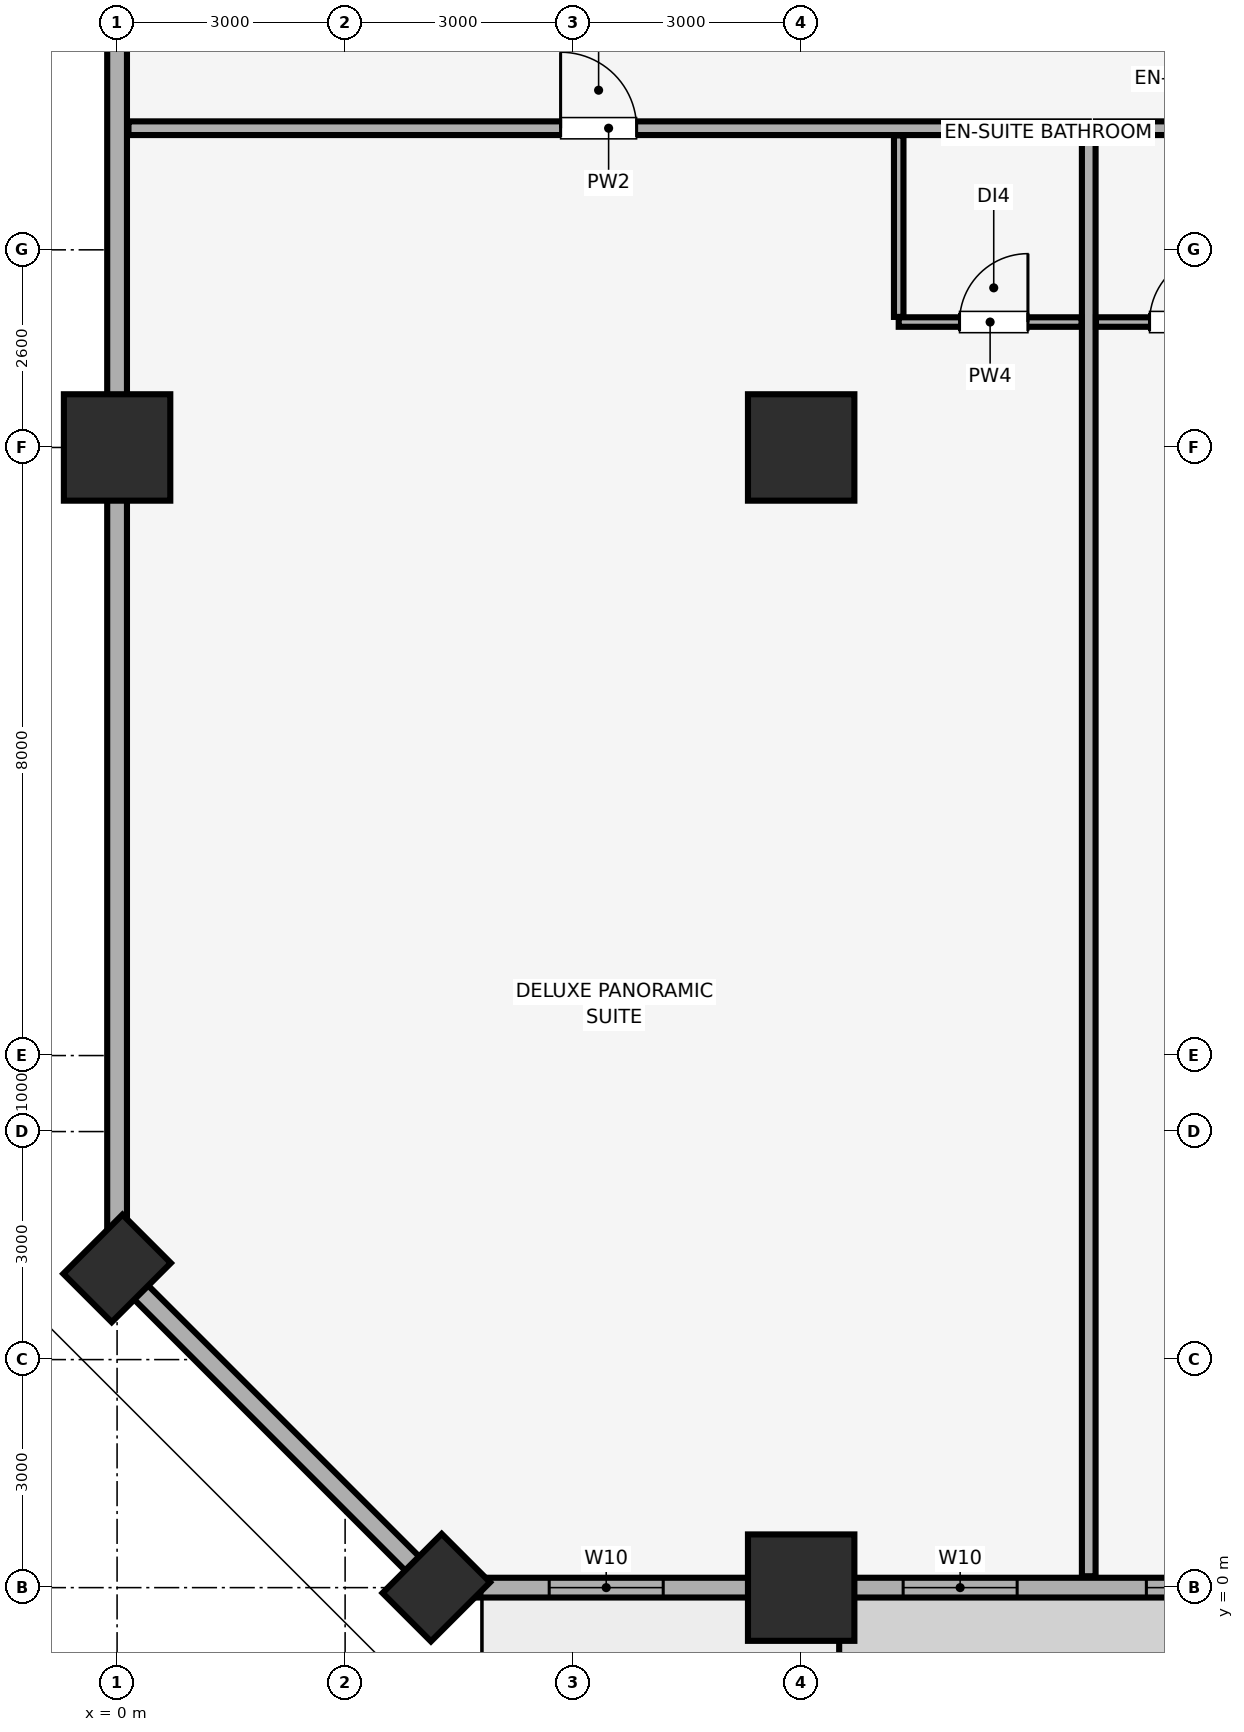
"""IFC4 building model, lengths in metres.
Left out: names, types, materials, properties, quantities, classifications, styles, units other than length and angle.
Written with IfcOpenShell. Run it as: python <this file> out.ifc"""

import sys

from ifc_helpers import new_model, si_unit, direction, frame, frame_2d, origin, origin_2d, place, context, subcontext, project, spatial, rectangle, extrude, element, fill, save


model = new_model("IFC4")
c1 = context("Model", 3, precision=1e-05, world=origin(), true_north=direction((0.0, 1.0)))
c2 = subcontext(c1, "Body", "Model", "MODEL_VIEW")
j1 = project(units=[si_unit("LENGTHUNIT", "METRE"), si_unit("PLANEANGLEUNIT", "RADIAN")], contexts=[c1])
p1 = place(None, origin())
s1 = spatial("IfcSite", under=j1, at=p1, CompositionType="ELEMENT")
p2 = place(p1, origin())
s2 = spatial("IfcBuilding", under=s1, at=p2, CompositionType="ELEMENT")
p3 = place(p2, frame((0.0, 0.0, 76.4)))
s3 = spatial("IfcBuildingStorey", under=s2, at=p3, CompositionType="ELEMENT", Elevation=76.4)
for number, where, z_axis, x_axis in (
    (1, (9.0, 0.0, 0.0), (0.0, 0.0, 1.0), (1.0, 0.0, 0.0)),
    (2, (0.0, 15.0, 0.0), (0.0, 0.0, 1.0), (1.0, 0.0, 0.0)),
):
    element("IfcColumn", number, at=place(p3, frame(where, z_axis=z_axis, x_axis=x_axis)), inside=s3, PredefinedType="COLUMN", context=c2, shape_type="SweptSolid", body=[
        extrude(rectangle(XDim=1.4, YDim=1.4, at=origin_2d()), origin(), (0.0, 0.0, 1.0), 3.4),
    ])
for number, where, z_axis, x_axis in (
    (3, (4.2, 0.0, 0.0), (0.0, 0.0, 1.0), (0.707, 0.707, 0.0)),
    (4, (0.0, 4.2, 0.0), (0.0, 0.0, 1.0), (0.707, 0.707, 0.0)),
):
    element("IfcColumn", number, at=place(p3, frame(where, z_axis=z_axis, x_axis=x_axis)), inside=s3, PredefinedType="PILASTER", context=c2, shape_type="SweptSolid", body=[
        extrude(rectangle(XDim=1.1, YDim=0.9, at=origin_2d()), origin(), (0.0, 0.0, 1.0), 3.4),
    ])
p4 = place(p3, frame((9.0, 15.0, 0.0), z_axis=(0.0, 0.0, 1.0), x_axis=(1.0, 0.0, 0.0)))
e5 = element("IfcColumn", 5, at=p4, inside=s3, PredefinedType="COLUMN", context=c2, shape_type="SweptSolid", body=[
    extrude(rectangle(XDim=1.4, YDim=1.4, at=origin_2d()), origin(), (0.0, 0.0, 1.0), 3.4),
])
p5 = place(p3, frame((4.2, 0.0, 0.0), z_axis=(0.0, 0.0, 1.0), x_axis=(1.0, 0.0, 0.0)))
e6 = element("IfcWall", 6, at=p5, inside=s3, PredefinedType="SOLIDWALL", context=c2, shape_type="SweptSolid", body=[
    extrude(rectangle(XDim=75.6, YDim=0.26, at=frame_2d((37.8, 0.0))), origin(), (0.0, 0.0, 1.0), 2.45),
])
p6 = place(p5, frame((21.383, 0.0, 0.0)))
e7 = element("IfcOpeningElement", 7, at=p6, cuts=e6, PredefinedType="OPENING", context=c2, shape_type="SweptSolid", body=[
    extrude(rectangle(XDim=1.1, YDim=2.15, at=frame_2d((0.55, 1.075))), frame((0.0, 0.14, 0.0), z_axis=(0.0, -1.0, 0.0), x_axis=(1.0, 0.0, 0.0)), (0.0, 0.0, 1.0), 0.28),
])
p7 = place(p5, frame((37.25, 0.0, 0.0)))
e8 = element("IfcOpeningElement", 8, at=p7, cuts=e6, PredefinedType="OPENING", context=c2, shape_type="SweptSolid", body=[
    extrude(rectangle(XDim=1.1, YDim=2.15, at=frame_2d((0.55, 1.075))), frame((0.0, 0.14, 0.0), z_axis=(0.0, -1.0, 0.0), x_axis=(1.0, 0.0, 0.0)), (0.0, 0.0, 1.0), 0.28),
])
p8 = place(p5, frame((53.117, 0.0, 0.0)))
e9 = element("IfcOpeningElement", 9, at=p8, cuts=e6, PredefinedType="OPENING", context=c2, shape_type="SweptSolid", body=[
    extrude(rectangle(XDim=1.1, YDim=2.15, at=frame_2d((0.55, 1.075))), frame((0.0, 0.14, 0.0), z_axis=(0.0, -1.0, 0.0), x_axis=(1.0, 0.0, 0.0)), (0.0, 0.0, 1.0), 0.28),
])
p9 = place(p5, frame((1.485, 0.0, 0.85)))
e10 = element("IfcOpeningElement", 10, at=p9, cuts=e6, PredefinedType="OPENING", context=c2, shape_type="SweptSolid", body=[
    extrude(rectangle(XDim=1.5, YDim=1.4, at=frame_2d((0.75, 0.7))), frame((0.0, 0.14, 0.0), z_axis=(0.0, -1.0, 0.0), x_axis=(1.0, 0.0, 0.0)), (0.0, 0.0, 1.0), 0.28),
])
p10 = place(p5, frame((6.142, 0.0, 0.85)))
e11 = element("IfcOpeningElement", 11, at=p10, cuts=e6, PredefinedType="OPENING", context=c2, shape_type="SweptSolid", body=[
    extrude(rectangle(XDim=1.5, YDim=1.4, at=frame_2d((0.75, 0.7))), frame((0.0, 0.14, 0.0), z_axis=(0.0, -1.0, 0.0), x_axis=(1.0, 0.0, 0.0)), (0.0, 0.0, 1.0), 0.28),
])
p11 = place(p5, frame((9.342, 0.0, 0.85)))
e12 = element("IfcOpeningElement", 12, at=p11, cuts=e6, PredefinedType="OPENING", context=c2, shape_type="SweptSolid", body=[
    extrude(rectangle(XDim=1.5, YDim=1.4, at=frame_2d((0.75, 0.7))), frame((0.0, 0.14, 0.0), z_axis=(0.0, -1.0, 0.0), x_axis=(1.0, 0.0, 0.0)), (0.0, 0.0, 1.0), 0.28),
])
p12 = place(p5, frame((13.908, 0.0, 0.85)))
e13 = element("IfcOpeningElement", 13, at=p12, cuts=e6, PredefinedType="OPENING", context=c2, shape_type="SweptSolid", body=[
    extrude(rectangle(XDim=1.5, YDim=1.4, at=frame_2d((0.75, 0.7))), frame((0.0, 0.14, 0.0), z_axis=(0.0, -1.0, 0.0), x_axis=(1.0, 0.0, 0.0)), (0.0, 0.0, 1.0), 0.28),
])
p13 = place(p5, frame((23.202, 0.0, 0.85)))
e14 = element("IfcOpeningElement", 14, at=p13, cuts=e6, PredefinedType="OPENING", context=c2, shape_type="SweptSolid", body=[
    extrude(rectangle(XDim=1.5, YDim=1.4, at=frame_2d((0.75, 0.7))), frame((0.0, 0.14, 0.0), z_axis=(0.0, -1.0, 0.0), x_axis=(1.0, 0.0, 0.0)), (0.0, 0.0, 1.0), 0.28),
])
p14 = place(p5, frame((29.25, 0.0, 0.85)))
e15 = element("IfcOpeningElement", 15, at=p14, cuts=e6, PredefinedType="OPENING", context=c2, shape_type="SweptSolid", body=[
    extrude(rectangle(XDim=1.5, YDim=1.4, at=frame_2d((0.75, 0.7))), frame((0.0, 0.14, 0.0), z_axis=(0.0, -1.0, 0.0), x_axis=(1.0, 0.0, 0.0)), (0.0, 0.0, 1.0), 0.28),
])
p15 = place(p5, frame((34.79, 0.0, 0.85)))
e16 = element("IfcOpeningElement", 16, at=p15, cuts=e6, PredefinedType="OPENING", context=c2, shape_type="SweptSolid", body=[
    extrude(rectangle(XDim=1.5, YDim=1.4, at=frame_2d((0.75, 0.7))), frame((0.0, 0.14, 0.0), z_axis=(0.0, -1.0, 0.0), x_axis=(1.0, 0.0, 0.0)), (0.0, 0.0, 1.0), 0.28),
])
p16 = place(p5, frame((39.31, 0.0, 0.85)))
e17 = element("IfcOpeningElement", 17, at=p16, cuts=e6, PredefinedType="OPENING", context=c2, shape_type="SweptSolid", body=[
    extrude(rectangle(XDim=1.5, YDim=1.4, at=frame_2d((0.75, 0.7))), frame((0.0, 0.14, 0.0), z_axis=(0.0, -1.0, 0.0), x_axis=(1.0, 0.0, 0.0)), (0.0, 0.0, 1.0), 0.28),
])
p17 = place(p5, frame((44.85, 0.0, 0.85)))
e18 = element("IfcOpeningElement", 18, at=p17, cuts=e6, PredefinedType="OPENING", context=c2, shape_type="SweptSolid", body=[
    extrude(rectangle(XDim=1.5, YDim=1.4, at=frame_2d((0.75, 0.7))), frame((0.0, 0.14, 0.0), z_axis=(0.0, -1.0, 0.0), x_axis=(1.0, 0.0, 0.0)), (0.0, 0.0, 1.0), 0.28),
])
p18 = place(p5, frame((50.848, 0.0, 0.85)))
e19 = element("IfcOpeningElement", 19, at=p18, cuts=e6, PredefinedType="OPENING", context=c2, shape_type="SweptSolid", body=[
    extrude(rectangle(XDim=1.5, YDim=1.4, at=frame_2d((0.75, 0.7))), frame((0.0, 0.14, 0.0), z_axis=(0.0, -1.0, 0.0), x_axis=(1.0, 0.0, 0.0)), (0.0, 0.0, 1.0), 0.28),
])
p19 = place(p5, frame((60.142, 0.0, 0.85)))
e20 = element("IfcOpeningElement", 20, at=p19, cuts=e6, PredefinedType="OPENING", context=c2, shape_type="SweptSolid", body=[
    extrude(rectangle(XDim=1.5, YDim=1.4, at=frame_2d((0.75, 0.7))), frame((0.0, 0.14, 0.0), z_axis=(0.0, -1.0, 0.0), x_axis=(1.0, 0.0, 0.0)), (0.0, 0.0, 1.0), 0.28),
])
p20 = place(p5, frame((64.708, 0.0, 0.85)))
e21 = element("IfcOpeningElement", 21, at=p20, cuts=e6, PredefinedType="OPENING", context=c2, shape_type="SweptSolid", body=[
    extrude(rectangle(XDim=1.5, YDim=1.4, at=frame_2d((0.75, 0.7))), frame((0.0, 0.14, 0.0), z_axis=(0.0, -1.0, 0.0), x_axis=(1.0, 0.0, 0.0)), (0.0, 0.0, 1.0), 0.28),
])
p21 = place(p5, frame((67.908, 0.0, 0.85)))
e22 = element("IfcOpeningElement", 22, at=p21, cuts=e6, PredefinedType="OPENING", context=c2, shape_type="SweptSolid", body=[
    extrude(rectangle(XDim=1.5, YDim=1.4, at=frame_2d((0.75, 0.7))), frame((0.0, 0.14, 0.0), z_axis=(0.0, -1.0, 0.0), x_axis=(1.0, 0.0, 0.0)), (0.0, 0.0, 1.0), 0.28),
])
p22 = place(p5, frame((72.615, 0.0, 0.85)))
e23 = element("IfcOpeningElement", 23, at=p22, cuts=e6, PredefinedType="OPENING", context=c2, shape_type="SweptSolid", body=[
    extrude(rectangle(XDim=1.5, YDim=1.4, at=frame_2d((0.75, 0.7))), frame((0.0, 0.14, 0.0), z_axis=(0.0, -1.0, 0.0), x_axis=(1.0, 0.0, 0.0)), (0.0, 0.0, 1.0), 0.28),
])
p23 = place(p3, frame((0.0, 44.8, 0.0), z_axis=(0.0, 0.0, 1.0), x_axis=(0.0, -1.0, 0.0)))
e24 = element("IfcWall", 24, at=p23, inside=s3, PredefinedType="SOLIDWALL", context=c2, shape_type="SweptSolid", body=[
    extrude(rectangle(XDim=40.6, YDim=0.26, at=frame_2d((20.3, 0.0))), origin(), (0.0, 0.0, 1.0), 2.45),
])
p24 = place(p3, frame((0.0, 4.2, 0.0), z_axis=(0.0, 0.0, 1.0), x_axis=(0.707106781187, -0.707106781187, 0.0)))
e25 = element("IfcWall", 25, at=p24, inside=s3, PredefinedType="SOLIDWALL", context=c2, shape_type="SweptSolid", body=[
    extrude(rectangle(XDim=5.94, YDim=0.26, at=frame_2d((2.97, 0.0))), origin(), (0.0, 0.0, 1.0), 2.45),
])
p25 = place(p3, frame((0.15, 19.2, 0.0), z_axis=(0.0, 0.0, 1.0), x_axis=(1.0, 0.0, 0.0)))
e26 = element("IfcWall", 26, at=p25, inside=s3, PredefinedType="PARTITIONING", context=c2, shape_type="SweptSolid", body=[
    extrude(rectangle(XDim=12.633, YDim=0.18, at=frame_2d((6.317, 0.0))), origin(), (0.0, 0.0, 1.0), 3.4),
])
p26 = place(p25, frame((5.685, 0.0, 0.0)))
e27 = element("IfcOpeningElement", 27, at=p26, cuts=e26, PredefinedType="OPENING", context=c2, shape_type="SweptSolid", body=[
    extrude(rectangle(XDim=1.0, YDim=2.15, at=frame_2d((0.5, 1.075))), frame((0.0, 0.1, 0.0), z_axis=(0.0, -1.0, 0.0), x_axis=(1.0, 0.0, 0.0)), (0.0, 0.0, 1.0), 0.2),
])
p27 = place(p3, frame((12.783, 0.15, 0.0), z_axis=(0.0, 0.0, 1.0), x_axis=(0.0, 1.0, 0.0)))
e28 = element("IfcWall", 28, at=p27, inside=s3, PredefinedType="PARTITIONING", context=c2, shape_type="SweptSolid", body=[
    extrude(rectangle(XDim=18.955, YDim=0.18, at=frame_2d((9.478, 0.0))), origin(), (0.0, 0.0, 1.0), 2.8),
])
p28 = place(p3, frame((10.283, 16.65, 0.0), z_axis=(0.0, 0.0, 1.0), x_axis=(1.0, 0.0, 0.0)))
e29 = element("IfcWall", 29, at=p28, inside=s3, PredefinedType="PARTITIONING", context=c2, shape_type="SweptSolid", body=[
    extrude(rectangle(XDim=2.405, YDim=0.125, at=frame_2d((1.203, 0.0))), origin(), (0.0, 0.0, 1.0), 3.4),
])
p29 = place(p28, frame((0.8, 0.0, 0.0)))
e30 = element("IfcOpeningElement", 30, at=p29, cuts=e29, PredefinedType="OPENING", context=c2, shape_type="SweptSolid", body=[
    extrude(rectangle(XDim=0.9, YDim=2.1, at=frame_2d((0.45, 1.05))), frame((0.0, 0.073, 0.0), z_axis=(0.0, -1.0, 0.0), x_axis=(1.0, 0.0, 0.0)), (0.0, 0.0, 1.0), 0.145),
])
p30 = place(p3, frame((10.283, 16.718, 0.0), z_axis=(0.0, 0.0, 1.0), x_axis=(0.0, 1.0, 0.0)))
e31 = element("IfcWall", 31, at=p30, inside=s3, PredefinedType="PARTITIONING", context=c2, shape_type="SweptSolid", body=[
    extrude(rectangle(XDim=2.387, YDim=0.125, at=frame_2d((1.194, 0.0))), origin(), (0.0, 0.0, 1.0), 3.4),
])
p31 = place(p3, frame((12.878, 19.2, 0.0), z_axis=(0.0, 0.0, 1.0), x_axis=(1.0, 0.0, 0.0)))
e32 = element("IfcWall", 32, at=p31, inside=s3, PredefinedType="PARTITIONING", context=c2, shape_type="SweptSolid", body=[
    extrude(rectangle(XDim=8.238, YDim=0.18, at=frame_2d((4.119, 0.0))), origin(), (0.0, 0.0, 1.0), 3.4),
])
p32 = place(p31, frame((5.67, 0.0, 0.0)))
e33 = element("IfcOpeningElement", 33, at=p32, cuts=e32, PredefinedType="OPENING", context=c2, shape_type="SweptSolid", body=[
    extrude(rectangle(XDim=1.0, YDim=2.15, at=frame_2d((0.5, 1.075))), frame((0.0, 0.1, 0.0), z_axis=(0.0, -1.0, 0.0), x_axis=(1.0, 0.0, 0.0)), (0.0, 0.0, 1.0), 0.2),
])
p33 = place(p3, frame((12.878, 16.65, 0.0), z_axis=(0.0, 0.0, 1.0), x_axis=(1.0, 0.0, 0.0)))
e34 = element("IfcWall", 34, at=p33, inside=s3, PredefinedType="PARTITIONING", context=c2, shape_type="SweptSolid", body=[
    extrude(rectangle(XDim=2.405, YDim=0.125, at=frame_2d((1.202, 0.0))), origin(), (0.0, 0.0, 1.0), 3.4),
])
p34 = place(p33, frame((0.705, 0.0, 0.0)))
e35 = element("IfcOpeningElement", 35, at=p34, cuts=e34, PredefinedType="OPENING", context=c2, shape_type="SweptSolid", body=[
    extrude(rectangle(XDim=0.9, YDim=2.1, at=frame_2d((0.45, 1.05))), frame((0.0, 0.073, 0.0), z_axis=(0.0, -1.0, 0.0), x_axis=(1.0, 0.0, 0.0)), (0.0, 0.0, 1.0), 0.145),
])
p35 = place(p9, origin())
e36 = element("IfcWindow", 36, at=p35, inside=s3, PartitioningType="SINGLE_PANEL", PredefinedType="WINDOW", context=c2, shape_type="SweptSolid", body=[
    extrude(rectangle(XDim=1.5, YDim=1.4, at=frame_2d((0.75, 0.7))), frame((0.0, 0.03, 0.0), z_axis=(0.0, -1.0, 0.0), x_axis=(1.0, 0.0, 0.0)), (0.0, 0.0, 1.0), 0.06),
])
fill(e10, e36)
p36 = place(p10, origin())
e37 = element("IfcWindow", 37, at=p36, inside=s3, PartitioningType="SINGLE_PANEL", PredefinedType="WINDOW", context=c2, shape_type="SweptSolid", body=[
    extrude(rectangle(XDim=1.5, YDim=1.4, at=frame_2d((0.75, 0.7))), frame((0.0, 0.03, 0.0), z_axis=(0.0, -1.0, 0.0), x_axis=(1.0, 0.0, 0.0)), (0.0, 0.0, 1.0), 0.06),
])
fill(e11, e37)
p37 = place(p11, origin())
e38 = element("IfcWindow", 38, at=p37, inside=s3, PartitioningType="SINGLE_PANEL", PredefinedType="WINDOW", context=c2, shape_type="SweptSolid", body=[
    extrude(rectangle(XDim=1.5, YDim=1.4, at=frame_2d((0.75, 0.7))), frame((0.0, 0.03, 0.0), z_axis=(0.0, -1.0, 0.0), x_axis=(1.0, 0.0, 0.0)), (0.0, 0.0, 1.0), 0.06),
])
fill(e12, e38)
p38 = place(p26, origin())
e39 = element("IfcDoor", 39, at=p38, inside=s3, OperationType="SINGLE_SWING_LEFT", PredefinedType="DOOR", context=c2, shape_type="SweptSolid", body=[
    extrude(rectangle(XDim=1.0, YDim=2.15, at=frame_2d((0.5, 1.075))), frame((0.0, 0.025, 0.0), z_axis=(0.0, -1.0, 0.0), x_axis=(1.0, 0.0, 0.0)), (0.0, 0.0, 1.0), 0.05),
])
fill(e27, e39)
p39 = place(p29, origin())
e40 = element("IfcDoor", 40, at=p39, inside=s3, OperationType="SINGLE_SWING_RIGHT", PredefinedType="DOOR", context=c2, shape_type="SweptSolid", body=[
    extrude(rectangle(XDim=0.9, YDim=2.1, at=frame_2d((0.45, 1.05))), frame((0.0, 0.025, 0.0), z_axis=(0.0, -1.0, 0.0), x_axis=(1.0, 0.0, 0.0)), (0.0, 0.0, 1.0), 0.05),
])
fill(e30, e40)
p40 = place(p34, origin())
e41 = element("IfcDoor", 41, at=p40, inside=s3, OperationType="SINGLE_SWING_RIGHT", PredefinedType="DOOR", context=c2, shape_type="SweptSolid", body=[
    extrude(rectangle(XDim=0.9, YDim=2.1, at=frame_2d((0.45, 1.05))), frame((0.0, 0.025, 0.0), z_axis=(0.0, -1.0, 0.0), x_axis=(1.0, 0.0, 0.0)), (0.0, 0.0, 1.0), 0.05),
])
fill(e35, e41)
save(model, sys.argv[1])
